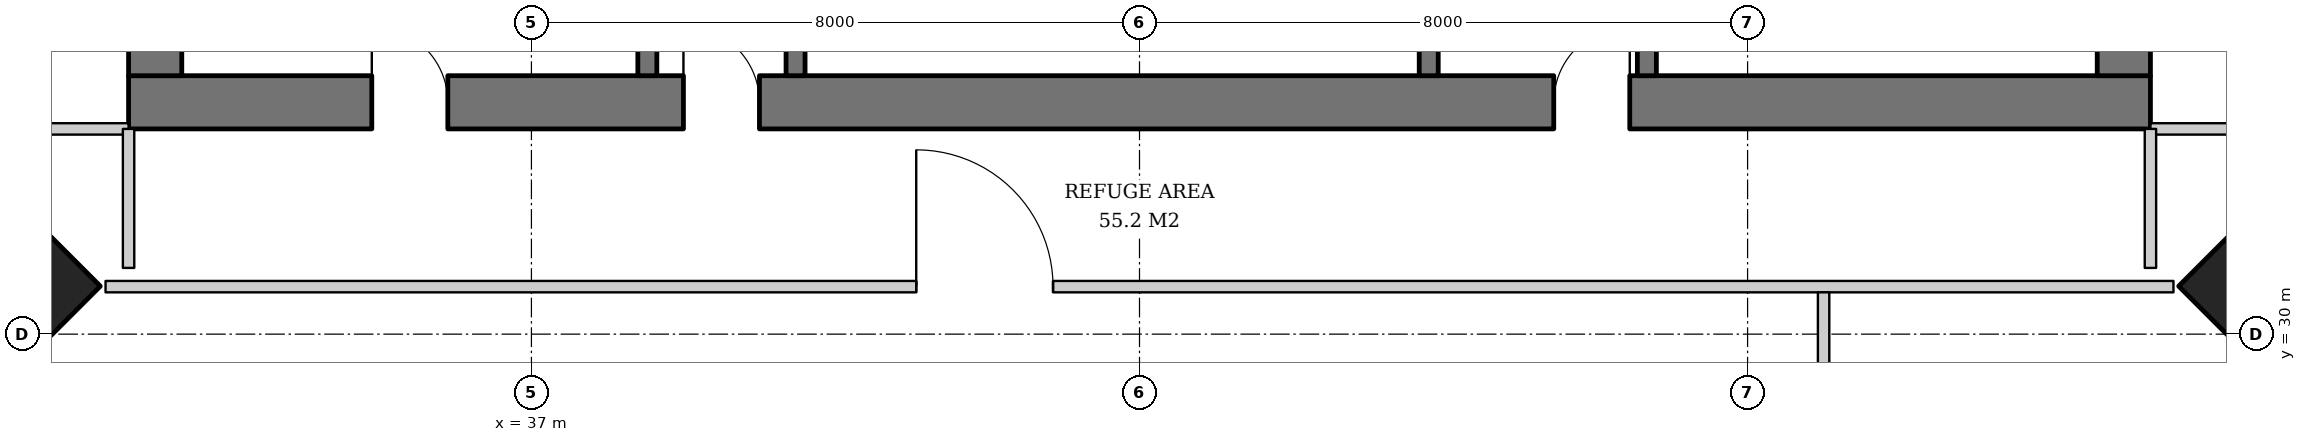
"""IFC4 building model, lengths in metres.
Left out: names, types, materials, properties, quantities, classifications, styles, units other than length and angle.
Written with IfcOpenShell. Run it as: python <this file> out.ifc"""

import sys

from ifc_helpers import new_model, si_unit, direction, frame, frame_2d, origin, origin_2d, place, context, subcontext, project, spatial, rectangle, extrude, element, fill, save


model = new_model("IFC4")
c1 = context("Model", 3, precision=1e-05, world=origin(), true_north=direction((0.0, 1.0)))
c2 = subcontext(c1, "Body", "Model", "MODEL_VIEW")
j1 = project(units=[si_unit("LENGTHUNIT", "METRE"), si_unit("PLANEANGLEUNIT", "RADIAN")], contexts=[c1])
p1 = place(None, origin())
s1 = spatial("IfcSite", under=j1, at=p1, CompositionType="ELEMENT")
p2 = place(p1, origin())
s2 = spatial("IfcBuilding", under=s1, at=p2, CompositionType="ELEMENT")
p3 = place(p2, frame((0.0, 0.0, 161.6)))
s3 = spatial("IfcBuildingStorey", under=s2, at=p3, CompositionType="ELEMENT", Elevation=161.6)
for number, where, z_axis, x_axis in (
    (1, (29.593, 30.593, 0.0), (0.032, 0.032, 0.999), (-0.707, 0.707, 0.0)),
    (2, (60.407, 30.593, 0.0), (-0.032, 0.032, 0.999), (-0.707, -0.707, 0.0)),
):
    element("IfcColumn", number, at=place(p3, frame(where, z_axis=z_axis, x_axis=x_axis)), inside=s3, PredefinedType="COLUMN", context=c2, shape_type="SweptSolid", body=[
        extrude(rectangle(XDim=2.4, YDim=2.4, at=origin_2d()), origin(), (0.0, 0.0, 1.0), 3.804),
    ])
p4 = place(p3, frame((31.7, 33.05, 0.0), z_axis=(0.0, 0.0, 1.0), x_axis=(1.0, 0.0, 0.0)))
e3 = element("IfcWall", 3, at=p4, inside=s3, PredefinedType="SHEAR", context=c2, shape_type="SweptSolid", body=[
    extrude(rectangle(XDim=26.6, YDim=0.7, at=frame_2d((13.3, 0.0))), origin(), (0.0, 0.0, 1.0), 3.8),
])
p5 = place(p4, frame((7.3, 0.0, 0.0)))
e4 = element("IfcOpeningElement", 4, at=p5, cuts=e3, PredefinedType="OPENING", context=c2, shape_type="SweptSolid", body=[
    extrude(rectangle(XDim=1.0, YDim=2.1, at=frame_2d((0.5, 1.05))), frame((0.0, 0.36, 0.0), z_axis=(0.0, -1.0, 0.0), x_axis=(1.0, 0.0, 0.0)), (0.0, 0.0, 1.0), 0.72),
])
p6 = place(p4, frame((18.75, 0.0, 0.0)))
e5 = element("IfcOpeningElement", 5, at=p6, cuts=e3, PredefinedType="OPENING", context=c2, shape_type="SweptSolid", body=[
    extrude(rectangle(XDim=1.0, YDim=2.1, at=frame_2d((0.5, 1.05))), frame((0.0, 0.36, 0.0), z_axis=(0.0, -1.0, 0.0), x_axis=(1.0, 0.0, 0.0)), (0.0, 0.0, 1.0), 0.72),
])
p7 = place(p4, frame((3.2, 0.0, 0.0)))
e6 = element("IfcOpeningElement", 6, at=p7, cuts=e3, PredefinedType="OPENING", context=c2, shape_type="SweptSolid", body=[
    extrude(rectangle(XDim=1.0, YDim=2.1, at=frame_2d((0.5, 1.05))), frame((0.0, 0.36, 0.0), z_axis=(0.0, -1.0, 0.0), x_axis=(1.0, 0.0, 0.0)), (0.0, 0.0, 1.0), 0.72),
])
p8 = place(p3, frame((32.05, 33.4, 0.0), z_axis=(0.0, 0.0, 1.0), x_axis=(0.0, 1.0, 0.0)))
e7 = element("IfcWall", 7, at=p8, inside=s3, PredefinedType="SHEAR", context=c2, shape_type="SweptSolid", body=[
    extrude(rectangle(XDim=25.2, YDim=0.7, at=frame_2d((12.6, 0.0))), origin(), (0.0, 0.0, 1.0), 3.8),
])
p9 = place(p8, frame((11.7, 0.0, 0.0)))
e8 = element("IfcOpeningElement", 8, at=p9, cuts=e7, PredefinedType="OPENING", context=c2, shape_type="SweptSolid", body=[
    extrude(rectangle(XDim=1.8, YDim=2.4, at=frame_2d((0.9, 1.2))), frame((0.0, 0.36, 0.0), z_axis=(0.0, -1.0, 0.0), x_axis=(1.0, 0.0, 0.0)), (0.0, 0.0, 1.0), 0.72),
])
p10 = place(p8, frame((3.55, 0.0, 0.0)))
e9 = element("IfcOpeningElement", 9, at=p10, cuts=e7, PredefinedType="OPENING", context=c2, shape_type="SweptSolid", body=[
    extrude(rectangle(XDim=1.0, YDim=2.1, at=frame_2d((0.5, 1.05))), frame((0.0, 0.36, 0.0), z_axis=(0.0, -1.0, 0.0), x_axis=(1.0, 0.0, 0.0)), (0.0, 0.0, 1.0), 0.72),
])
p11 = place(p8, frame((6.4, 0.0, 0.0)))
e10 = element("IfcOpeningElement", 10, at=p11, cuts=e7, PredefinedType="OPENING", context=c2, shape_type="SweptSolid", body=[
    extrude(rectangle(XDim=1.0, YDim=2.1, at=frame_2d((0.5, 1.05))), frame((0.0, 0.36, 0.0), z_axis=(0.0, -1.0, 0.0), x_axis=(1.0, 0.0, 0.0)), (0.0, 0.0, 1.0), 0.72),
])
p12 = place(p8, frame((9.1, 0.0, 0.0)))
e11 = element("IfcOpeningElement", 11, at=p12, cuts=e7, PredefinedType="OPENING", context=c2, shape_type="SweptSolid", body=[
    extrude(rectangle(XDim=1.0, YDim=2.1, at=frame_2d((0.5, 1.05))), frame((0.0, 0.36, 0.0), z_axis=(0.0, -1.0, 0.0), x_axis=(1.0, 0.0, 0.0)), (0.0, 0.0, 1.0), 0.72),
])
p13 = place(p8, frame((15.1, 0.0, 0.0)))
e12 = element("IfcOpeningElement", 12, at=p13, cuts=e7, PredefinedType="OPENING", context=c2, shape_type="SweptSolid", body=[
    extrude(rectangle(XDim=1.0, YDim=2.1, at=frame_2d((0.5, 1.05))), frame((0.0, 0.36, 0.0), z_axis=(0.0, -1.0, 0.0), x_axis=(1.0, 0.0, 0.0)), (0.0, 0.0, 1.0), 0.72),
])
p14 = place(p8, frame((17.75, 0.0, 0.0)))
e13 = element("IfcOpeningElement", 13, at=p14, cuts=e7, PredefinedType="OPENING", context=c2, shape_type="SweptSolid", body=[
    extrude(rectangle(XDim=1.0, YDim=2.1, at=frame_2d((0.5, 1.05))), frame((0.0, 0.36, 0.0), z_axis=(0.0, -1.0, 0.0), x_axis=(1.0, 0.0, 0.0)), (0.0, 0.0, 1.0), 0.72),
])
p15 = place(p3, frame((57.95, 33.4, 0.0), z_axis=(0.0, 0.0, 1.0), x_axis=(0.0, 1.0, 0.0)))
e14 = element("IfcWall", 14, at=p15, inside=s3, PredefinedType="SHEAR", context=c2, shape_type="SweptSolid", body=[
    extrude(rectangle(XDim=25.2, YDim=0.7, at=frame_2d((12.6, 0.0))), origin(), (0.0, 0.0, 1.0), 3.8),
])
p16 = place(p15, frame((11.7, 0.0, 0.0)))
e15 = element("IfcOpeningElement", 15, at=p16, cuts=e14, PredefinedType="OPENING", context=c2, shape_type="SweptSolid", body=[
    extrude(rectangle(XDim=1.8, YDim=2.4, at=frame_2d((0.9, 1.2))), frame((0.0, 0.36, 0.0), z_axis=(0.0, -1.0, 0.0), x_axis=(1.0, 0.0, 0.0)), (0.0, 0.0, 1.0), 0.72),
])
p17 = place(p3, frame((38.525, 33.4, 0.0), z_axis=(0.0, 0.0, 1.0), x_axis=(0.0, 1.0, 0.0)))
e16 = element("IfcWall", 16, at=p17, inside=s3, PredefinedType="SOLIDWALL", context=c2, shape_type="SweptSolid", body=[
    extrude(rectangle(XDim=2.7, YDim=0.25, at=frame_2d((1.35, 0.0))), origin(), (0.0, 0.0, 1.0), 3.2),
])
p18 = place(p3, frame((40.475, 33.4, 0.0), z_axis=(0.0, 0.0, 1.0), x_axis=(0.0, 1.0, 0.0)))
e17 = element("IfcWall", 17, at=p18, inside=s3, PredefinedType="SOLIDWALL", context=c2, shape_type="SweptSolid", body=[
    extrude(rectangle(XDim=2.7, YDim=0.25, at=frame_2d((1.35, 0.0))), origin(), (0.0, 0.0, 1.0), 3.2),
])
p19 = place(p18, frame((0.85, 0.0, 0.0)))
e18 = element("IfcOpeningElement", 18, at=p19, cuts=e17, PredefinedType="OPENING", context=c2, shape_type="SweptSolid", body=[
    extrude(rectangle(XDim=1.0, YDim=2.1, at=frame_2d((0.5, 1.05))), frame((0.0, 0.135, 0.0), z_axis=(0.0, -1.0, 0.0), x_axis=(1.0, 0.0, 0.0)), (0.0, 0.0, 1.0), 0.27),
])
p20 = place(p3, frame((48.805, 33.4, 0.0), z_axis=(0.0, 0.0, 1.0), x_axis=(0.0, 1.0, 0.0)))
e19 = element("IfcWall", 19, at=p20, inside=s3, PredefinedType="SOLIDWALL", context=c2, shape_type="SweptSolid", body=[
    extrude(rectangle(XDim=2.7, YDim=0.25, at=frame_2d((1.35, 0.0))), origin(), (0.0, 0.0, 1.0), 3.2),
])
p21 = place(p20, frame((0.85, 0.0, 0.0)))
e20 = element("IfcOpeningElement", 20, at=p21, cuts=e19, PredefinedType="OPENING", context=c2, shape_type="SweptSolid", body=[
    extrude(rectangle(XDim=1.0, YDim=2.1, at=frame_2d((0.5, 1.05))), frame((0.0, 0.135, 0.0), z_axis=(0.0, -1.0, 0.0), x_axis=(1.0, 0.0, 0.0)), (0.0, 0.0, 1.0), 0.27),
])
p22 = place(p3, frame((51.675, 33.4, 0.0), z_axis=(0.0, 0.0, 1.0), x_axis=(0.0, 1.0, 0.0)))
e21 = element("IfcWall", 21, at=p22, inside=s3, PredefinedType="SOLIDWALL", context=c2, shape_type="SweptSolid", body=[
    extrude(rectangle(XDim=2.7, YDim=0.25, at=frame_2d((1.35, 0.0))), origin(), (0.0, 0.0, 1.0), 3.2),
])
p23 = place(p22, frame((0.85, 0.0, 0.0)))
e22 = element("IfcOpeningElement", 22, at=p23, cuts=e21, PredefinedType="OPENING", context=c2, shape_type="SweptSolid", body=[
    extrude(rectangle(XDim=1.0, YDim=2.1, at=frame_2d((0.5, 1.05))), frame((0.0, 0.135, 0.0), z_axis=(0.0, -1.0, 0.0), x_axis=(1.0, 0.0, 0.0)), (0.0, 0.0, 1.0), 0.27),
])
for number, where, z_axis, x_axis in (
    (23, (58.3, 32.7, 0.0), (0.0, 0.0, 1.0), (1.0, 0.0, 0.0)),
    (24, (31.7, 32.7, 0.0), (0.0, 0.0, 1.0), (-1.0, 0.0, 0.0)),
    (25, (58.3, 32.7, 0.0), (0.0, 0.0, 1.0), (0.0, -1.0, 0.0)),
    (26, (31.7, 32.7, 0.0), (0.0, 0.0, 1.0), (0.0, -1.0, 0.0)),
):
    element("IfcWall", number, at=place(p3, frame(where, z_axis=z_axis, x_axis=x_axis)), inside=s3, PredefinedType="PARTITIONING", context=c2, shape_type="SweptSolid", body=[
        extrude(rectangle(XDim=1.829, YDim=0.15, at=frame_2d((0.915, 0.0))), origin(), (0.0, 0.0, 1.0), 3.6),
    ])
p24 = place(p3, frame((31.397, 30.625, 0.0), z_axis=(0.0, 0.0, 1.0), x_axis=(1.0, 0.0, 0.0)))
e27 = element("IfcWall", 27, at=p24, inside=s3, PredefinedType="PARTITIONING", context=c2, shape_type="SweptSolid", body=[
    extrude(rectangle(XDim=27.206, YDim=0.15, at=frame_2d((13.603, 0.0))), origin(), (0.0, 0.0, 1.0), 2.83),
])
p25 = place(p24, frame((10.666, 0.0, 0.0)))
e28 = element("IfcOpeningElement", 28, at=p25, cuts=e27, PredefinedType="OPENING", context=c2, shape_type="SweptSolid", body=[
    extrude(rectangle(XDim=1.8, YDim=2.4, at=frame_2d((0.9, 1.2))), frame((0.0, 0.085, 0.0), z_axis=(0.0, -1.0, 0.0), x_axis=(1.0, 0.0, 0.0)), (0.0, 0.0, 1.0), 0.17),
])
p26 = place(p3, frame((54.0, 30.55, 0.0), z_axis=(0.0, 0.0, 1.0), x_axis=(0.0, -1.0, 0.0)))
e29 = element("IfcWall", 29, at=p26, inside=s3, PredefinedType="PARTITIONING", context=c2, shape_type="SweptSolid", body=[
    extrude(rectangle(XDim=5.59, YDim=0.15, at=frame_2d((2.795, 0.0))), origin(), (0.0, 0.0, 1.0), 3.6),
])
p27 = place(p5, origin())
e30 = element("IfcDoor", 30, at=p27, inside=s3, OperationType="SINGLE_SWING_LEFT", PredefinedType="DOOR", context=c2, shape_type="SweptSolid", body=[
    extrude(rectangle(XDim=1.0, YDim=2.1, at=frame_2d((0.5, 1.05))), frame((0.0, 0.025, 0.0), z_axis=(0.0, -1.0, 0.0), x_axis=(1.0, 0.0, 0.0)), (0.0, 0.0, 1.0), 0.05),
])
fill(e4, e30)
p28 = place(p6, origin())
e31 = element("IfcDoor", 31, at=p28, inside=s3, OperationType="SINGLE_SWING_RIGHT", PredefinedType="DOOR", context=c2, shape_type="SweptSolid", body=[
    extrude(rectangle(XDim=1.0, YDim=2.1, at=frame_2d((0.5, 1.05))), frame((0.0, 0.025, 0.0), z_axis=(0.0, -1.0, 0.0), x_axis=(1.0, 0.0, 0.0)), (0.0, 0.0, 1.0), 0.05),
])
fill(e5, e31)
p29 = place(p7, origin())
e32 = element("IfcDoor", 32, at=p29, inside=s3, OperationType="SINGLE_SWING_LEFT", PredefinedType="DOOR", context=c2, shape_type="SweptSolid", body=[
    extrude(rectangle(XDim=1.0, YDim=2.1, at=frame_2d((0.5, 1.05))), frame((0.0, 0.34, 0.0), z_axis=(0.0, -1.0, 0.0), x_axis=(1.0, 0.0, 0.0)), (0.0, 0.0, 1.0), 0.05),
])
fill(e6, e32)
p30 = place(p25, origin())
e33 = element("IfcDoor", 33, at=p30, inside=s3, OperationType="DOUBLE_DOOR_SINGLE_SWING", PredefinedType="DOOR", context=c2, shape_type="SweptSolid", body=[
    extrude(rectangle(XDim=1.8, YDim=2.4, at=frame_2d((0.9, 1.2))), frame((0.0, 0.025, 0.0), z_axis=(0.0, -1.0, 0.0), x_axis=(1.0, 0.0, 0.0)), (0.0, 0.0, 1.0), 0.05),
])
fill(e28, e33)
save(model, sys.argv[1])
